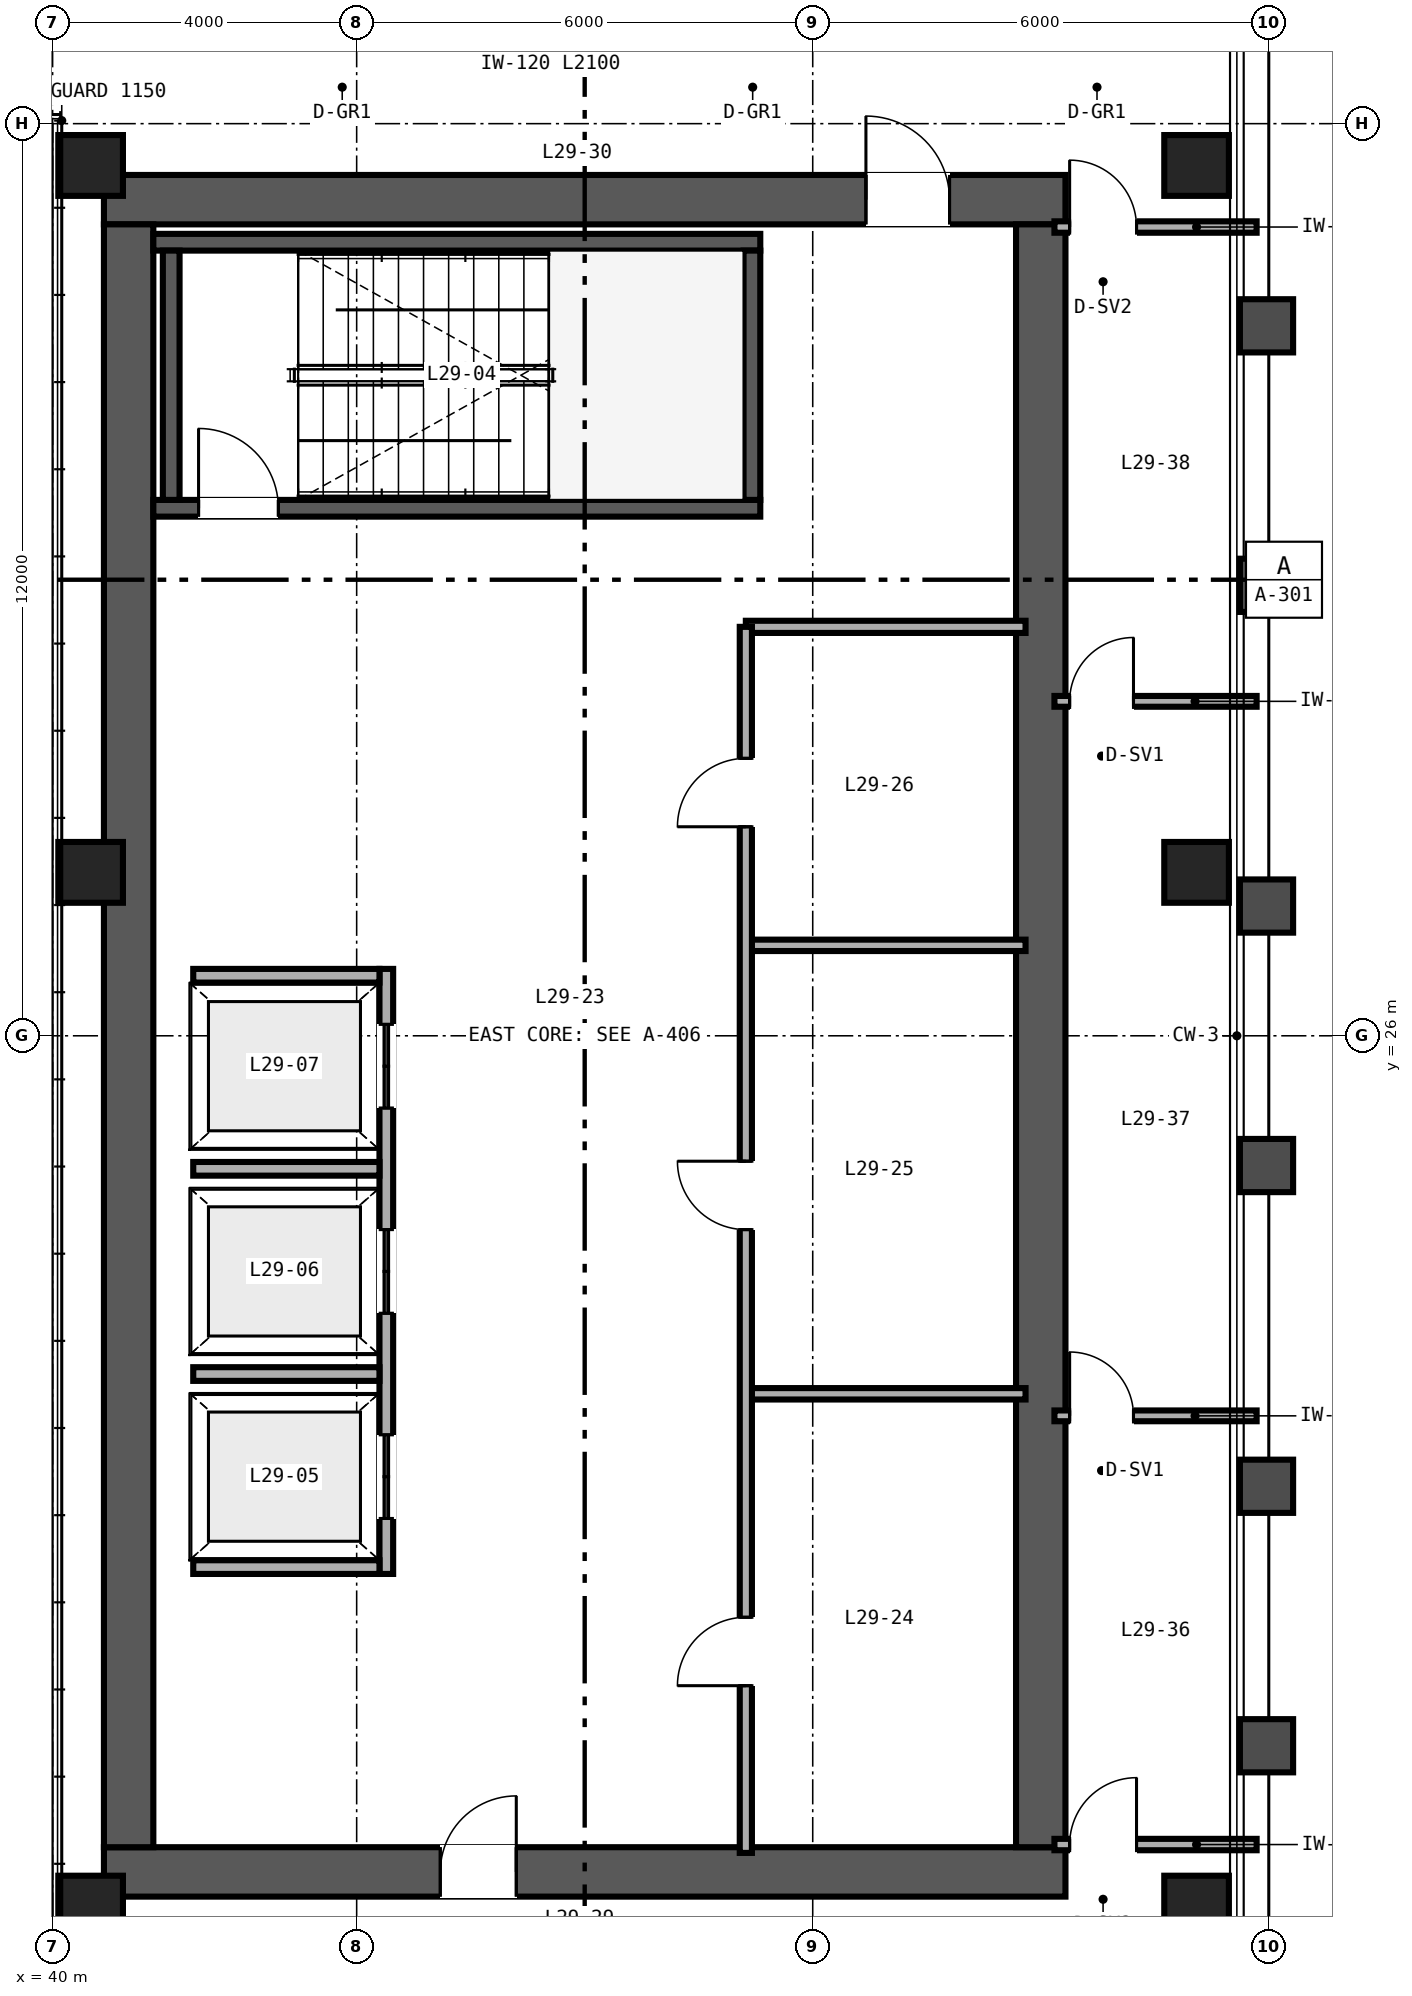
"""IFC4 building model, lengths in metres.
Left out: names, types, materials, properties, quantities, classifications, styles, units other than length and angle.
Written with IfcOpenShell. Run it as: python <this file> out.ifc"""

import sys

from ifc_helpers import new_model, si_unit, direction, frame, frame_2d, origin, origin_2d, place, context, subcontext, project, spatial, rectangle, hollow_rectangle, extrude, source, transform, mapped, element, fill, save


model = new_model("IFC4")
c1 = context("Model", 3, precision=1e-05, world=origin(), true_north=direction((0.0, 1.0)))
c2 = subcontext(c1, "Body", "Model", "MODEL_VIEW")
j1 = project(units=[si_unit("LENGTHUNIT", "METRE"), si_unit("PLANEANGLEUNIT", "RADIAN")], contexts=[c1])
p1 = place(None, origin())
s1 = spatial("IfcSite", under=j1, at=p1, CompositionType="ELEMENT")
p2 = place(p1, origin())
s2 = spatial("IfcBuilding", under=s1, at=p2, CompositionType="ELEMENT")
p3 = place(p2, frame((0.0, 0.0, 118.8)))
s3 = spatial("IfcBuildingStorey", under=s2, at=p3, CompositionType="ELEMENT", Elevation=118.8)
p4 = place(p3, frame((40.675, 15.0, 0.0), z_axis=(0.0, 0.0, 1.0), x_axis=(1.0, 0.0, 0.0)))
e1 = element("IfcWall", 1, at=p4, inside=s3, PredefinedType="SHEAR", context=c2, shape_type="SweptSolid", body=[
    extrude(rectangle(XDim=12.65, YDim=0.65, at=frame_2d((6.325, 0.0))), origin(), (0.0, 0.0, 1.0), 3.36),
])
p5 = place(p4, frame((4.425, 0.0, 0.0)))
e2 = element("IfcOpeningElement", 2, at=p5, cuts=e1, PredefinedType="OPENING", context=c2, shape_type="SweptSolid", body=[
    extrude(rectangle(XDim=1.0, YDim=2.15, at=frame_2d((0.5, 1.075))), frame((0.0, 0.335, 0.0), z_axis=(0.0, -1.0, 0.0), x_axis=(1.0, 0.0, 0.0)), (0.0, 0.0, 1.0), 0.67),
])
p6 = place(p3, frame((40.675, 37.0, 0.0), z_axis=(0.0, 0.0, 1.0), x_axis=(1.0, 0.0, 0.0)))
e3 = element("IfcWall", 3, at=p6, inside=s3, PredefinedType="SHEAR", context=c2, shape_type="SweptSolid", body=[
    extrude(rectangle(XDim=12.65, YDim=0.65, at=frame_2d((6.325, 0.0))), origin(), (0.0, 0.0, 1.0), 3.36),
])
p7 = place(p6, frame((10.025, 0.0, 0.0)))
e4 = element("IfcOpeningElement", 4, at=p7, cuts=e3, PredefinedType="OPENING", context=c2, shape_type="SweptSolid", body=[
    extrude(rectangle(XDim=1.1, YDim=2.15, at=frame_2d((0.55, 1.075))), frame((0.0, 0.335, 0.0), z_axis=(0.0, -1.0, 0.0), x_axis=(1.0, 0.0, 0.0)), (0.0, 0.0, 1.0), 0.67),
])
for number, where, z_axis, x_axis in (
    (5, (41.0, 15.325, 0.0), (0.0, 0.0, 1.0), (0.0, 1.0, 0.0)),
    (6, (53.0, 15.325, 0.0), (0.0, 0.0, 1.0), (0.0, 1.0, 0.0)),
):
    element("IfcWall", number, at=place(p3, frame(where, z_axis=z_axis, x_axis=x_axis)), inside=s3, PredefinedType="SHEAR", context=c2, shape_type="SweptSolid", body=[
        extrude(rectangle(XDim=21.35, YDim=0.65, at=frame_2d((10.675, 0.0))), origin(), (0.0, 0.0, 1.0), 3.36),
    ])
p8 = place(p3, frame((41.325, 32.94, 0.0), z_axis=(0.0, 0.0, 1.0), x_axis=(1.0, 0.0, 0.0)))
e7 = element("IfcWall", 7, at=p8, inside=s3, PredefinedType="SHEAR", context=c2, shape_type="SweptSolid", body=[
    extrude(rectangle(XDim=7.985, YDim=0.22, at=frame_2d((3.993, 0.0))), origin(), (0.0, 0.0, 1.0), 3.4),
])
p9 = place(p8, frame((0.595, 0.0, 0.0)))
e8 = element("IfcOpeningElement", 8, at=p9, cuts=e7, PredefinedType="OPENING", context=c2, shape_type="SweptSolid", body=[
    extrude(rectangle(XDim=1.05, YDim=2.15, at=frame_2d((0.525, 1.075))), frame((0.0, 0.12, 0.0), z_axis=(0.0, -1.0, 0.0), x_axis=(1.0, 0.0, 0.0)), (0.0, 0.0, 1.0), 0.24),
])
p10 = place(p3, frame((41.325, 36.44, 0.0), z_axis=(0.0, 0.0, 1.0), x_axis=(1.0, 0.0, 0.0)))
e9 = element("IfcWall", 9, at=p10, inside=s3, PredefinedType="SHEAR", context=c2, shape_type="SweptSolid", body=[
    extrude(rectangle(XDim=7.985, YDim=0.22, at=frame_2d((3.993, 0.0))), origin(), (0.0, 0.0, 1.0), 3.4),
])
for number, where, z_axis, x_axis in (
    (10, (41.56, 33.05, 0.0), (0.0, 0.0, 1.0), (0.0, 1.0, 0.0)),
    (11, (49.2, 33.05, 0.0), (0.0, 0.0, 1.0), (0.0, 1.0, 0.0)),
):
    element("IfcWall", number, at=place(p3, frame(where, z_axis=z_axis, x_axis=x_axis)), inside=s3, PredefinedType="SHEAR", context=c2, shape_type="SweptSolid", body=[
        extrude(rectangle(XDim=3.28, YDim=0.22, at=frame_2d((1.64, 0.0))), origin(), (0.0, 0.0, 1.0), 3.4),
    ])
m1 = source(origin(), c2, "Body", "SweptSolid", [
    extrude(hollow_rectangle(XDim=0.85, YDim=0.8, WallThickness=0.032, at=origin_2d()), origin(), (0.0, 0.0, 1.0), 3.36),
])
for number, where, z_axis, x_axis in (
    (12, (40.5, 14.55, 0.0), (0.0, 0.0, 1.0), (1.0, 0.0, 0.0)),
    (13, (55.05, 14.55, 0.0), (0.0, 0.0, 1.0), (1.0, 0.0, 0.0)),
    (14, (40.5, 28.15, 0.0), (0.0, 0.0, 1.0), (1.0, 0.0, 0.0)),
    (15, (55.05, 28.15, 0.0), (0.0, 0.0, 1.0), (1.0, 0.0, 0.0)),
    (16, (40.5, 37.45, 0.0), (0.0, 0.0, 1.0), (1.0, 0.0, 0.0)),
    (17, (55.05, 37.45, 0.0), (0.0, 0.0, 1.0), (1.0, 0.0, 0.0)),
):
    element("IfcColumn", number, at=place(p3, frame(where, z_axis=z_axis, x_axis=x_axis)), inside=s3, PredefinedType="COLUMN", context=c2, shape_type="MappedRepresentation", body=[
        mapped(m1, transform((0.0, 0.0, 0.0), scale=1.0)),
    ])
p11 = place(p3, frame((44.39, 18.92, 0.0), z_axis=(0.0, 0.0, 1.0), x_axis=(0.0, 1.0, 0.0)))
e18 = element("IfcWall", 18, at=p11, inside=s3, PredefinedType="SOLIDWALL", context=c2, shape_type="SweptSolid", body=[
    extrude(rectangle(XDim=7.96, YDim=0.18, at=frame_2d((3.98, 0.0))), origin(), (0.0, 0.0, 1.0), 3.36),
])
p12 = place(p11, frame((0.73, 0.0, 0.0)))
e19 = element("IfcOpeningElement", 19, at=p12, cuts=e18, PredefinedType="OPENING", context=c2, shape_type="SweptSolid", body=[
    extrude(rectangle(XDim=1.1, YDim=2.2, at=frame_2d((0.55, 1.1))), frame((0.0, 0.1, 0.0), z_axis=(0.0, -1.0, 0.0), x_axis=(1.0, 0.0, 0.0)), (0.0, 0.0, 1.0), 0.2),
])
p13 = place(p11, frame((3.43, 0.0, 0.0)))
e20 = element("IfcOpeningElement", 20, at=p13, cuts=e18, PredefinedType="OPENING", context=c2, shape_type="SweptSolid", body=[
    extrude(rectangle(XDim=1.1, YDim=2.2, at=frame_2d((0.55, 1.1))), frame((0.0, 0.1, 0.0), z_axis=(0.0, -1.0, 0.0), x_axis=(1.0, 0.0, 0.0)), (0.0, 0.0, 1.0), 0.2),
])
p14 = place(p11, frame((6.13, 0.0, 0.0)))
e21 = element("IfcOpeningElement", 21, at=p14, cuts=e18, PredefinedType="OPENING", context=c2, shape_type="SweptSolid", body=[
    extrude(rectangle(XDim=1.1, YDim=2.2, at=frame_2d((0.55, 1.1))), frame((0.0, 0.1, 0.0), z_axis=(0.0, -1.0, 0.0), x_axis=(1.0, 0.0, 0.0)), (0.0, 0.0, 1.0), 0.2),
])
for number, where, z_axis, x_axis in (
    (22, (41.85, 19.01, 0.0), (0.0, 0.0, 1.0), (1.0, 0.0, 0.0)),
    (23, (41.85, 26.79, 0.0), (0.0, 0.0, 1.0), (1.0, 0.0, 0.0)),
    (24, (41.85, 21.55, 0.0), (0.0, 0.0, 1.0), (1.0, 0.0, 0.0)),
    (25, (41.85, 24.25, 0.0), (0.0, 0.0, 1.0), (1.0, 0.0, 0.0)),
):
    element("IfcWall", number, at=place(p3, frame(where, z_axis=z_axis, x_axis=x_axis)), inside=s3, PredefinedType="SOLIDWALL", context=c2, shape_type="SweptSolid", body=[
        extrude(rectangle(XDim=2.45, YDim=0.18, at=frame_2d((1.225, 0.0))), origin(), (0.0, 0.0, 1.0), 3.36),
    ])
p15 = place(p3, frame((49.12, 31.38, 0.0), z_axis=(0.0, 0.0, 1.0), x_axis=(1.0, 0.0, 0.0)))
e26 = element("IfcWall", 26, at=p15, inside=s3, PredefinedType="PARTITIONING", context=c2, shape_type="SweptSolid", body=[
    extrude(rectangle(XDim=3.68, YDim=0.16, at=frame_2d((1.84, 0.0))), origin(), (0.0, 0.0, 1.0), 2.36),
])
for number, where, z_axis, x_axis in (
    (27, (49.12, 21.29, 0.0), (0.0, 0.0, 1.0), (1.0, 0.0, 0.0)),
    (28, (49.12, 27.19, 0.0), (0.0, 0.0, 1.0), (1.0, 0.0, 0.0)),
):
    element("IfcWall", number, at=place(p3, frame(where, z_axis=z_axis, x_axis=x_axis)), inside=s3, PredefinedType="PARTITIONING", context=c2, shape_type="SweptSolid", body=[
        extrude(rectangle(XDim=3.68, YDim=0.15, at=frame_2d((1.84, 0.0))), origin(), (0.0, 0.0, 1.0), 3.36),
    ])
p16 = place(p3, frame((49.12, 15.25, 0.0), z_axis=(0.0, 0.0, 1.0), x_axis=(0.0, 1.0, 0.0)))
e29 = element("IfcWall", 29, at=p16, inside=s3, PredefinedType="PARTITIONING", context=c2, shape_type="SweptSolid", body=[
    extrude(rectangle(XDim=16.13, YDim=0.16, at=frame_2d((8.065, 0.0))), origin(), (0.0, 0.0, 1.0), 2.36),
])
p17 = place(p16, frame((2.2, 0.0, 0.0)))
e30 = element("IfcOpeningElement", 30, at=p17, cuts=e29, PredefinedType="OPENING", context=c2, shape_type="SweptSolid", body=[
    extrude(rectangle(XDim=0.9, YDim=2.15, at=frame_2d((0.45, 1.075))), frame((0.0, 0.09, 0.0), z_axis=(0.0, -1.0, 0.0), x_axis=(1.0, 0.0, 0.0)), (0.0, 0.0, 1.0), 0.18),
])
p18 = place(p16, frame((8.2, 0.0, 0.0)))
e31 = element("IfcOpeningElement", 31, at=p18, cuts=e29, PredefinedType="OPENING", context=c2, shape_type="SweptSolid", body=[
    extrude(rectangle(XDim=0.9, YDim=2.15, at=frame_2d((0.45, 1.075))), frame((0.0, 0.09, 0.0), z_axis=(0.0, -1.0, 0.0), x_axis=(1.0, 0.0, 0.0)), (0.0, 0.0, 1.0), 0.18),
])
p19 = place(p16, frame((13.5, 0.0, 0.0)))
e32 = element("IfcOpeningElement", 32, at=p19, cuts=e29, PredefinedType="OPENING", context=c2, shape_type="SweptSolid", body=[
    extrude(rectangle(XDim=0.9, YDim=2.15, at=frame_2d((0.45, 1.075))), frame((0.0, 0.09, 0.0), z_axis=(0.0, -1.0, 0.0), x_axis=(1.0, 0.0, 0.0)), (0.0, 0.0, 1.0), 0.18),
])
p20 = place(p3, frame((53.18, 15.36, 0.0), z_axis=(0.0, 0.0, 1.0), x_axis=(1.0, 0.0, 0.0)))
e33 = element("IfcWall", 33, at=p20, inside=s3, PredefinedType="PARTITIONING", context=c2, shape_type="SweptSolid", body=[
    extrude(rectangle(XDim=2.66, YDim=0.15, at=frame_2d((1.33, 0.0))), origin(), (0.0, 0.0, 1.0), 2.581),
])
p21 = place(p20, frame((0.2, 0.0, 0.0)))
e34 = element("IfcOpeningElement", 34, at=p21, cuts=e33, PredefinedType="OPENING", context=c2, shape_type="SweptSolid", body=[
    extrude(rectangle(XDim=0.88, YDim=2.15, at=frame_2d((0.44, 1.075))), frame((0.0, 0.085, 0.0), z_axis=(0.0, -1.0, 0.0), x_axis=(1.0, 0.0, 0.0)), (0.0, 0.0, 1.0), 0.17),
])
p22 = place(p3, frame((53.18, 36.64, 0.0), z_axis=(0.0, 0.0, 1.0), x_axis=(1.0, 0.0, 0.0)))
e35 = element("IfcWall", 35, at=p22, inside=s3, PredefinedType="PARTITIONING", context=c2, shape_type="SweptSolid", body=[
    extrude(rectangle(XDim=2.66, YDim=0.15, at=frame_2d((1.33, 0.0))), origin(), (0.0, 0.0, 1.0), 2.743),
])
p23 = place(p22, frame((0.2, 0.0, 0.0)))
e36 = element("IfcOpeningElement", 36, at=p23, cuts=e35, PredefinedType="OPENING", context=c2, shape_type="SweptSolid", body=[
    extrude(rectangle(XDim=0.88, YDim=2.15, at=frame_2d((0.44, 1.075))), frame((0.0, 0.085, 0.0), z_axis=(0.0, -1.0, 0.0), x_axis=(1.0, 0.0, 0.0)), (0.0, 0.0, 1.0), 0.17),
])
p24 = place(p3, frame((53.18, 21.0, 0.0), z_axis=(0.0, 0.0, 1.0), x_axis=(1.0, 0.0, 0.0)))
e37 = element("IfcWall", 37, at=p24, inside=s3, PredefinedType="PARTITIONING", context=c2, shape_type="SweptSolid", body=[
    extrude(rectangle(XDim=2.66, YDim=0.142, at=frame_2d((1.33, 0.0))), origin(), (0.0, 0.0, 1.0), 2.581),
])
p25 = place(p24, frame((0.2, 0.0, 0.0)))
e38 = element("IfcOpeningElement", 38, at=p25, cuts=e37, PredefinedType="OPENING", context=c2, shape_type="SweptSolid", body=[
    extrude(rectangle(XDim=0.84, YDim=2.1, at=frame_2d((0.42, 1.05))), frame((0.0, 0.081, 0.0), z_axis=(0.0, -1.0, 0.0), x_axis=(1.0, 0.0, 0.0)), (0.0, 0.0, 1.0), 0.162),
])
p26 = place(p3, frame((53.18, 30.4, 0.0), z_axis=(0.0, 0.0, 1.0), x_axis=(1.0, 0.0, 0.0)))
e39 = element("IfcWall", 39, at=p26, inside=s3, PredefinedType="PARTITIONING", context=c2, shape_type="SweptSolid", body=[
    extrude(rectangle(XDim=2.66, YDim=0.142, at=frame_2d((1.33, 0.0))), origin(), (0.0, 0.0, 1.0), 2.743),
])
p27 = place(p26, frame((0.2, 0.0, 0.0)))
e40 = element("IfcOpeningElement", 40, at=p27, cuts=e39, PredefinedType="OPENING", context=c2, shape_type="SweptSolid", body=[
    extrude(rectangle(XDim=0.84, YDim=2.1, at=frame_2d((0.42, 1.05))), frame((0.0, 0.081, 0.0), z_axis=(0.0, -1.0, 0.0), x_axis=(1.0, 0.0, 0.0)), (0.0, 0.0, 1.0), 0.162),
])
m2 = source(origin(), c2, "Body", "SweptSolid", [
    extrude(rectangle(XDim=1.05, YDim=2.15, at=frame_2d((0.525, 1.075))), frame((0.0, 0.025, 0.0), z_axis=(0.0, -1.0, 0.0), x_axis=(1.0, 0.0, 0.0)), (0.0, 0.0, 1.0), 0.05),
])
p28 = place(p9, origin())
e41 = element("IfcDoor", 41, at=p28, inside=s3, OperationType="SINGLE_SWING_LEFT", PredefinedType="DOOR", context=c2, shape_type="MappedRepresentation", body=[
    mapped(m2, transform((0.0, 0.0, 0.0), scale=1.0)),
])
fill(e8, e41)
m3 = source(origin(), c2, "Body", "SweptSolid", [
    extrude(rectangle(XDim=1.1, YDim=2.2, at=frame_2d((0.55, 1.1))), frame((0.0, 0.025, 0.0), z_axis=(0.0, -1.0, 0.0), x_axis=(1.0, 0.0, 0.0)), (0.0, 0.0, 1.0), 0.05),
])
p29 = place(p12, origin())
e42 = element("IfcDoor", 42, at=p29, inside=s3, OperationType="DOUBLE_DOOR_SLIDING", PredefinedType="DOOR", context=c2, shape_type="MappedRepresentation", body=[
    mapped(m3, transform((0.0, 0.0, 0.0), scale=1.0)),
])
fill(e19, e42)
p30 = place(p13, origin())
e43 = element("IfcDoor", 43, at=p30, inside=s3, OperationType="DOUBLE_DOOR_SLIDING", PredefinedType="DOOR", context=c2, shape_type="MappedRepresentation", body=[
    mapped(m3, transform((0.0, 0.0, 0.0), scale=1.0)),
])
fill(e20, e43)
p31 = place(p14, origin())
e44 = element("IfcDoor", 44, at=p31, inside=s3, OperationType="DOUBLE_DOOR_SLIDING", PredefinedType="DOOR", context=c2, shape_type="MappedRepresentation", body=[
    mapped(m3, transform((0.0, 0.0, 0.0), scale=1.0)),
])
fill(e21, e44)
m4 = source(origin(), c2, "Body", "SweptSolid", [
    extrude(rectangle(XDim=1.0, YDim=2.15, at=frame_2d((0.5, 1.075))), frame((0.0, 0.025, 0.0), z_axis=(0.0, -1.0, 0.0), x_axis=(1.0, 0.0, 0.0)), (0.0, 0.0, 1.0), 0.05),
])
p32 = place(p5, origin())
e45 = element("IfcDoor", 45, at=p32, inside=s3, OperationType="SINGLE_SWING_RIGHT", PredefinedType="DOOR", context=c2, shape_type="MappedRepresentation", body=[
    mapped(m4, transform((0.0, 0.0, 0.0), scale=1.0)),
])
fill(e2, e45)
m5 = source(origin(), c2, "Body", "SweptSolid", [
    extrude(rectangle(XDim=1.1, YDim=2.15, at=frame_2d((0.55, 1.075))), frame((0.0, 0.025, 0.0), z_axis=(0.0, -1.0, 0.0), x_axis=(1.0, 0.0, 0.0)), (0.0, 0.0, 1.0), 0.05),
])
p33 = place(p7, origin())
e46 = element("IfcDoor", 46, at=p33, inside=s3, OperationType="SINGLE_SWING_LEFT", PredefinedType="DOOR", context=c2, shape_type="MappedRepresentation", body=[
    mapped(m5, transform((0.0, 0.0, 0.0), scale=1.0)),
])
fill(e4, e46)
m6 = source(origin(), c2, "Body", "SweptSolid", [
    extrude(rectangle(XDim=0.9, YDim=2.15, at=frame_2d((0.45, 1.075))), frame((0.0, 0.025, 0.0), z_axis=(0.0, -1.0, 0.0), x_axis=(1.0, 0.0, 0.0)), (0.0, 0.0, 1.0), 0.05),
])
p34 = place(p17, origin())
e47 = element("IfcDoor", 47, at=p34, inside=s3, OperationType="SINGLE_SWING_LEFT", PredefinedType="DOOR", context=c2, shape_type="MappedRepresentation", body=[
    mapped(m6, transform((0.0, 0.0, 0.0), scale=1.0)),
])
fill(e30, e47)
p35 = place(p18, origin())
e48 = element("IfcDoor", 48, at=p35, inside=s3, OperationType="SINGLE_SWING_RIGHT", PredefinedType="DOOR", context=c2, shape_type="MappedRepresentation", body=[
    mapped(m6, transform((0.0, 0.0, 0.0), scale=1.0)),
])
fill(e31, e48)
p36 = place(p19, origin())
e49 = element("IfcDoor", 49, at=p36, inside=s3, OperationType="SINGLE_SWING_LEFT", PredefinedType="DOOR", context=c2, shape_type="MappedRepresentation", body=[
    mapped(m6, transform((0.0, 0.0, 0.0), scale=1.0)),
])
fill(e32, e49)
m7 = source(origin(), c2, "Body", "SweptSolid", [
    extrude(rectangle(XDim=0.88, YDim=2.15, at=frame_2d((0.44, 1.075))), frame((0.0, 0.025, 0.0), z_axis=(0.0, -1.0, 0.0), x_axis=(1.0, 0.0, 0.0)), (0.0, 0.0, 1.0), 0.05),
])
p37 = place(p21, origin())
e50 = element("IfcDoor", 50, at=p37, inside=s3, OperationType="SINGLE_SWING_RIGHT", PredefinedType="DOOR", context=c2, shape_type="MappedRepresentation", body=[
    mapped(m7, transform((0.0, 0.0, 0.0), scale=1.0)),
])
fill(e34, e50)
p38 = place(p23, origin())
e51 = element("IfcDoor", 51, at=p38, inside=s3, OperationType="SINGLE_SWING_LEFT", PredefinedType="DOOR", context=c2, shape_type="MappedRepresentation", body=[
    mapped(m7, transform((0.0, 0.0, 0.0), scale=1.0)),
])
fill(e36, e51)
m8 = source(origin(), c2, "Body", "SweptSolid", [
    extrude(rectangle(XDim=0.84, YDim=2.1, at=frame_2d((0.42, 1.05))), frame((0.0, 0.025, 0.0), z_axis=(0.0, -1.0, 0.0), x_axis=(1.0, 0.0, 0.0)), (0.0, 0.0, 1.0), 0.05),
])
p39 = place(p25, origin())
e52 = element("IfcDoor", 52, at=p39, inside=s3, OperationType="SINGLE_SWING_LEFT", PredefinedType="DOOR", context=c2, shape_type="MappedRepresentation", body=[
    mapped(m8, transform((0.0, 0.0, 0.0), scale=1.0)),
])
fill(e38, e52)
p40 = place(p27, origin())
e53 = element("IfcDoor", 53, at=p40, inside=s3, OperationType="SINGLE_SWING_RIGHT", PredefinedType="DOOR", context=c2, shape_type="MappedRepresentation", body=[
    mapped(m8, transform((0.0, 0.0, 0.0), scale=1.0)),
])
fill(e40, e53)
save(model, sys.argv[1])
